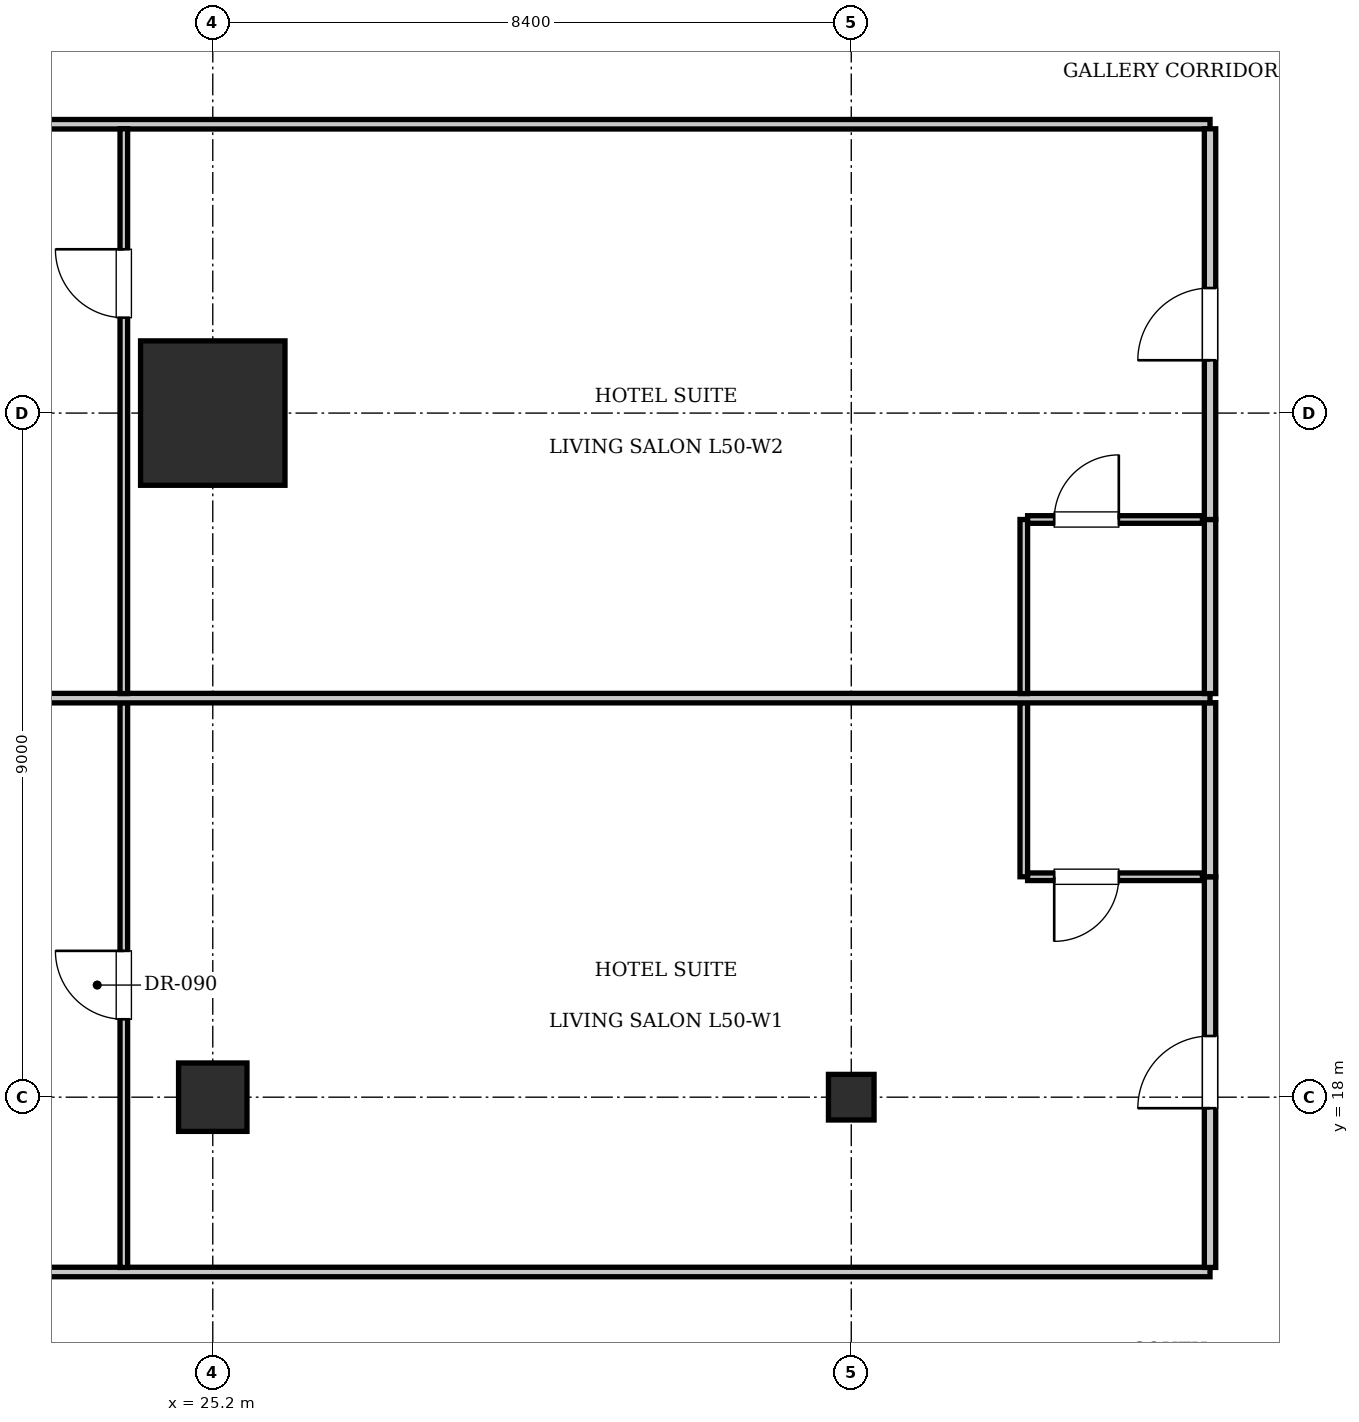
"""IFC4 building model, lengths in metres.
Left out: names, types, materials, properties, quantities, classifications, styles, units other than length and angle.
Written with IfcOpenShell. Run it as: python <this file> out.ifc"""

import sys

from ifc_helpers import new_model, si_unit, direction, frame, frame_2d, origin, origin_2d, place, context, subcontext, project, spatial, rectangle, i_section, extrude, element, fill, save


model = new_model("IFC4")
c1 = context("Model", 3, precision=1e-05, world=origin(), true_north=direction((0.0, 1.0)))
c2 = subcontext(c1, "Body", "Model", "MODEL_VIEW")
j1 = project(units=[si_unit("LENGTHUNIT", "METRE"), si_unit("PLANEANGLEUNIT", "RADIAN")], contexts=[c1])
p1 = place(None, origin())
s1 = spatial("IfcSite", under=j1, at=p1, CompositionType="ELEMENT")
p2 = place(p1, origin())
s2 = spatial("IfcBuilding", under=s1, at=p2, CompositionType="ELEMENT")
p3 = place(p2, frame((0.0, 0.0, 204.4)))
s3 = spatial("IfcBuildingStorey", under=s2, at=p3, CompositionType="ELEMENT", Elevation=204.4)
p4 = place(p3, frame((25.2, 27.0, 0.0), z_axis=(0.0, 0.0, 1.0), x_axis=(1.0, 0.0, 0.0)))
e1 = element("IfcColumn", 1, at=p4, inside=s3, PredefinedType="COLUMN", context=c2, shape_type="SweptSolid", body=[
    extrude(rectangle(XDim=1.9, YDim=1.9, at=origin_2d()), origin(), (0.0, 0.0, 1.0), 3.85),
])
p5 = place(p3, frame((25.2, 18.0, 0.0), z_axis=(0.0, 0.0, 1.0), x_axis=(1.0, 0.0, 0.0)))
e2 = element("IfcColumn", 2, at=p5, inside=s3, PredefinedType="COLUMN", context=c2, shape_type="SweptSolid", body=[
    extrude(rectangle(XDim=0.9, YDim=0.9, at=origin_2d()), origin(), (0.0, 0.0, 1.0), 3.85),
])
p6 = place(p3, frame((33.6, 18.0, 0.0), z_axis=(0.0, 0.0, 1.0), x_axis=(1.0, 0.0, 0.0)))
e3 = element("IfcColumn", 3, at=p6, inside=s3, PredefinedType="COLUMN", context=c2, shape_type="SweptSolid", body=[
    extrude(i_section(OverallWidth=0.6, OverallDepth=0.6, WebThickness=0.025, FlangeThickness=0.038, at=origin_2d()), origin(), (0.0, 0.0, 1.0), 3.85),
])
for number, where, z_axis, x_axis in (
    (4, (13.2, 15.7, 0.0), (0.0, 0.0, 1.0), (1.0, 0.0, 0.0)),
    (5, (13.2, 30.8, 0.0), (0.0, 0.0, 1.0), (1.0, 0.0, 0.0)),
):
    element("IfcWall", number, at=place(p3, frame(where, z_axis=z_axis, x_axis=x_axis)), inside=s3, PredefinedType="PARTITIONING", context=c2, shape_type="SweptSolid", body=[
        extrude(rectangle(XDim=25.12, YDim=0.125, at=frame_2d((12.56, 0.0))), origin(), (0.0, 0.0, 1.0), 3.61),
    ])
p7 = place(p3, frame((38.32, 15.76, 0.0), z_axis=(0.0, 0.0, 1.0), x_axis=(0.0, 1.0, 0.0)))
e6 = element("IfcWall", 6, at=p7, inside=s3, PredefinedType="PARTITIONING", context=c2, shape_type="SweptSolid", body=[
    extrude(rectangle(XDim=5.14, YDim=0.15, at=frame_2d((2.57, 0.0))), origin(), (0.0, 0.0, 1.0), 3.61),
])
p8 = place(p7, frame((2.095, 0.0, 0.0)))
e7 = element("IfcOpeningElement", 7, at=p8, cuts=e6, PredefinedType="OPENING", context=c2, shape_type="SweptSolid", body=[
    extrude(rectangle(XDim=0.95, YDim=2.15, at=frame_2d((0.475, 1.075))), frame((0.0, 0.085, 0.0), z_axis=(0.0, -1.0, 0.0), x_axis=(1.0, 0.0, 0.0)), (0.0, 0.0, 1.0), 0.17),
])
p9 = place(p3, frame((38.32, 20.9, 0.0), z_axis=(0.0, 0.0, 1.0), x_axis=(0.0, 1.0, 0.0)))
e8 = element("IfcWall", 8, at=p9, inside=s3, PredefinedType="PARTITIONING", context=c2, shape_type="SweptSolid", body=[
    extrude(rectangle(XDim=2.29, YDim=0.15, at=frame_2d((1.145, 0.0))), origin(), (0.0, 0.0, 1.0), 3.61),
])
p10 = place(p3, frame((35.87, 20.9, 0.0), z_axis=(0.0, 0.0, 1.0), x_axis=(0.0, 1.0, 0.0)))
e9 = element("IfcWall", 9, at=p10, inside=s3, PredefinedType="PARTITIONING", context=c2, shape_type="SweptSolid", body=[
    extrude(rectangle(XDim=2.29, YDim=0.1, at=frame_2d((1.145, 0.0))), origin(), (0.0, 0.0, 1.0), 3.61),
])
p11 = place(p3, frame((35.92, 20.9, 0.0), z_axis=(0.0, 0.0, 1.0), x_axis=(1.0, 0.0, 0.0)))
e10 = element("IfcWall", 10, at=p11, inside=s3, PredefinedType="PARTITIONING", context=c2, shape_type="SweptSolid", body=[
    extrude(rectangle(XDim=2.3, YDim=0.1, at=frame_2d((1.15, 0.0))), origin(), (0.0, 0.0, 1.0), 3.61),
])
p12 = place(p11, frame((0.35, 0.0, 0.0)))
e11 = element("IfcOpeningElement", 11, at=p12, cuts=e10, PredefinedType="OPENING", context=c2, shape_type="SweptSolid", body=[
    extrude(rectangle(XDim=0.85, YDim=2.1, at=frame_2d((0.425, 1.05))), frame((0.0, 0.06, 0.0), z_axis=(0.0, -1.0, 0.0), x_axis=(1.0, 0.0, 0.0)), (0.0, 0.0, 1.0), 0.12),
])
p13 = place(p3, frame((24.03, 15.76, 0.0), z_axis=(0.0, 0.0, 1.0), x_axis=(0.0, 1.0, 0.0)))
e12 = element("IfcWall", 12, at=p13, inside=s3, PredefinedType="PARTITIONING", context=c2, shape_type="SweptSolid", body=[
    extrude(rectangle(XDim=7.43, YDim=0.1, at=frame_2d((3.715, 0.0))), origin(), (0.0, 0.0, 1.0), 3.61),
])
p14 = place(p13, frame((3.265, 0.0, 0.0)))
e13 = element("IfcOpeningElement", 13, at=p14, cuts=e12, PredefinedType="OPENING", context=c2, shape_type="SweptSolid", body=[
    extrude(rectangle(XDim=0.9, YDim=2.1, at=frame_2d((0.45, 1.05))), frame((0.0, 0.06, 0.0), z_axis=(0.0, -1.0, 0.0), x_axis=(1.0, 0.0, 0.0)), (0.0, 0.0, 1.0), 0.12),
])
p15 = place(p3, frame((13.2, 23.25, 0.0), z_axis=(0.0, 0.0, 1.0), x_axis=(1.0, 0.0, 0.0)))
e14 = element("IfcWall", 14, at=p15, inside=s3, PredefinedType="PARTITIONING", context=c2, shape_type="SweptSolid", body=[
    extrude(rectangle(XDim=25.12, YDim=0.125, at=frame_2d((12.56, 0.0))), origin(), (0.0, 0.0, 1.0), 3.61),
])
p16 = place(p3, frame((38.32, 23.31, 0.0), z_axis=(0.0, 0.0, 1.0), x_axis=(0.0, 1.0, 0.0)))
e15 = element("IfcWall", 15, at=p16, inside=s3, PredefinedType="PARTITIONING", context=c2, shape_type="SweptSolid", body=[
    extrude(rectangle(XDim=2.29, YDim=0.15, at=frame_2d((1.145, 0.0))), origin(), (0.0, 0.0, 1.0), 3.61),
])
p17 = place(p3, frame((38.32, 25.6, 0.0), z_axis=(0.0, 0.0, 1.0), x_axis=(0.0, 1.0, 0.0)))
e16 = element("IfcWall", 16, at=p17, inside=s3, PredefinedType="PARTITIONING", context=c2, shape_type="SweptSolid", body=[
    extrude(rectangle(XDim=5.14, YDim=0.15, at=frame_2d((2.57, 0.0))), origin(), (0.0, 0.0, 1.0), 3.61),
])
p18 = place(p17, frame((2.095, 0.0, 0.0)))
e17 = element("IfcOpeningElement", 17, at=p18, cuts=e16, PredefinedType="OPENING", context=c2, shape_type="SweptSolid", body=[
    extrude(rectangle(XDim=0.95, YDim=2.15, at=frame_2d((0.475, 1.075))), frame((0.0, 0.085, 0.0), z_axis=(0.0, -1.0, 0.0), x_axis=(1.0, 0.0, 0.0)), (0.0, 0.0, 1.0), 0.17),
])
p19 = place(p3, frame((35.87, 23.31, 0.0), z_axis=(0.0, 0.0, 1.0), x_axis=(0.0, 1.0, 0.0)))
e18 = element("IfcWall", 18, at=p19, inside=s3, PredefinedType="PARTITIONING", context=c2, shape_type="SweptSolid", body=[
    extrude(rectangle(XDim=2.29, YDim=0.1, at=frame_2d((1.145, 0.0))), origin(), (0.0, 0.0, 1.0), 3.61),
])
p20 = place(p3, frame((35.92, 25.6, 0.0), z_axis=(0.0, 0.0, 1.0), x_axis=(1.0, 0.0, 0.0)))
e19 = element("IfcWall", 19, at=p20, inside=s3, PredefinedType="PARTITIONING", context=c2, shape_type="SweptSolid", body=[
    extrude(rectangle(XDim=2.3, YDim=0.1, at=frame_2d((1.15, 0.0))), origin(), (0.0, 0.0, 1.0), 3.61),
])
p21 = place(p20, frame((0.35, 0.0, 0.0)))
e20 = element("IfcOpeningElement", 20, at=p21, cuts=e19, PredefinedType="OPENING", context=c2, shape_type="SweptSolid", body=[
    extrude(rectangle(XDim=0.85, YDim=2.1, at=frame_2d((0.425, 1.05))), frame((0.0, 0.06, 0.0), z_axis=(0.0, -1.0, 0.0), x_axis=(1.0, 0.0, 0.0)), (0.0, 0.0, 1.0), 0.12),
])
p22 = place(p3, frame((24.03, 23.31, 0.0), z_axis=(0.0, 0.0, 1.0), x_axis=(0.0, 1.0, 0.0)))
e21 = element("IfcWall", 21, at=p22, inside=s3, PredefinedType="PARTITIONING", context=c2, shape_type="SweptSolid", body=[
    extrude(rectangle(XDim=7.43, YDim=0.1, at=frame_2d((3.715, 0.0))), origin(), (0.0, 0.0, 1.0), 3.61),
])
p23 = place(p22, frame((4.945, 0.0, 0.0)))
e22 = element("IfcOpeningElement", 22, at=p23, cuts=e21, PredefinedType="OPENING", context=c2, shape_type="SweptSolid", body=[
    extrude(rectangle(XDim=0.9, YDim=2.1, at=frame_2d((0.45, 1.05))), frame((0.0, 0.06, 0.0), z_axis=(0.0, -1.0, 0.0), x_axis=(1.0, 0.0, 0.0)), (0.0, 0.0, 1.0), 0.12),
])
p24 = place(p12, frame((0.85, 0.0, 0.0), z_axis=(0.0, 0.0, 1.0), x_axis=(-1.0, 0.0, 0.0)))
e23 = element("IfcDoor", 23, at=p24, inside=s3, OperationType="SINGLE_SWING_RIGHT", PredefinedType="DOOR", context=c2, shape_type="SweptSolid", body=[
    extrude(rectangle(XDim=0.85, YDim=2.1, at=frame_2d((0.425, 1.05))), frame((0.0, 0.025, 0.0), z_axis=(0.0, -1.0, 0.0), x_axis=(1.0, 0.0, 0.0)), (0.0, 0.0, 1.0), 0.05),
])
fill(e11, e23)
p25 = place(p8, origin())
e24 = element("IfcDoor", 24, at=p25, inside=s3, OperationType="SINGLE_SWING_LEFT", PredefinedType="DOOR", context=c2, shape_type="SweptSolid", body=[
    extrude(rectangle(XDim=0.95, YDim=2.15, at=frame_2d((0.475, 1.075))), frame((0.0, 0.025, 0.0), z_axis=(0.0, -1.0, 0.0), x_axis=(1.0, 0.0, 0.0)), (0.0, 0.0, 1.0), 0.05),
])
fill(e7, e24)
p26 = place(p14, origin())
e25 = element("IfcDoor", 25, at=p26, inside=s3, OperationType="SINGLE_SWING_RIGHT", PredefinedType="DOOR", context=c2, shape_type="SweptSolid", body=[
    extrude(rectangle(XDim=0.9, YDim=2.1, at=frame_2d((0.45, 1.05))), frame((0.0, 0.025, 0.0), z_axis=(0.0, -1.0, 0.0), x_axis=(1.0, 0.0, 0.0)), (0.0, 0.0, 1.0), 0.05),
])
fill(e13, e25)
p27 = place(p21, origin())
e26 = element("IfcDoor", 26, at=p27, inside=s3, OperationType="SINGLE_SWING_RIGHT", PredefinedType="DOOR", context=c2, shape_type="SweptSolid", body=[
    extrude(rectangle(XDim=0.85, YDim=2.1, at=frame_2d((0.425, 1.05))), frame((0.0, 0.025, 0.0), z_axis=(0.0, -1.0, 0.0), x_axis=(1.0, 0.0, 0.0)), (0.0, 0.0, 1.0), 0.05),
])
fill(e20, e26)
p28 = place(p18, origin())
e27 = element("IfcDoor", 27, at=p28, inside=s3, OperationType="SINGLE_SWING_LEFT", PredefinedType="DOOR", context=c2, shape_type="SweptSolid", body=[
    extrude(rectangle(XDim=0.95, YDim=2.15, at=frame_2d((0.475, 1.075))), frame((0.0, 0.025, 0.0), z_axis=(0.0, -1.0, 0.0), x_axis=(1.0, 0.0, 0.0)), (0.0, 0.0, 1.0), 0.05),
])
fill(e17, e27)
p29 = place(p23, origin())
e28 = element("IfcDoor", 28, at=p29, inside=s3, OperationType="SINGLE_SWING_RIGHT", PredefinedType="DOOR", context=c2, shape_type="SweptSolid", body=[
    extrude(rectangle(XDim=0.9, YDim=2.1, at=frame_2d((0.45, 1.05))), frame((0.0, 0.025, 0.0), z_axis=(0.0, -1.0, 0.0), x_axis=(1.0, 0.0, 0.0)), (0.0, 0.0, 1.0), 0.05),
])
fill(e22, e28)
save(model, sys.argv[1])
